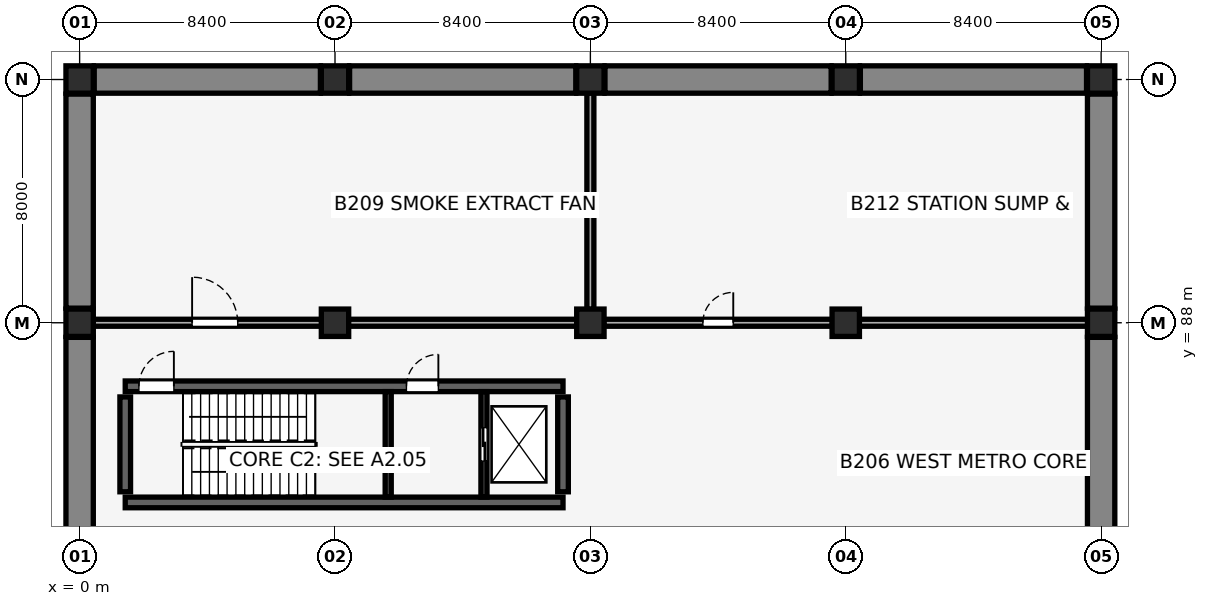
"""IFC4 building model, lengths in metres.
Left out: names, types, materials, properties, quantities, classifications, styles, units other than length and angle.
Written with IfcOpenShell. Run it as: python <this file> out.ifc"""

import sys

from ifc_helpers import new_model, si_unit, direction, frame, frame_2d, origin, origin_2d, place, context, subcontext, project, spatial, rectangle, extrude, element, fill, save


model = new_model("IFC4")
c1 = context("Model", 3, precision=1e-05, world=origin(), true_north=direction((0.0, 1.0)))
c2 = subcontext(c1, "Body", "Model", "MODEL_VIEW")
j1 = project(units=[si_unit("LENGTHUNIT", "METRE"), si_unit("PLANEANGLEUNIT", "RADIAN")], contexts=[c1])
p1 = place(None, origin())
s1 = spatial("IfcSite", under=j1, at=p1, CompositionType="ELEMENT")
p2 = place(p1, origin())
s2 = spatial("IfcBuilding", under=s1, at=p2, CompositionType="ELEMENT")
p3 = place(p2, frame((0.0, 0.0, -10.88)))
s3 = spatial("IfcBuildingStorey", under=s2, at=p3, CompositionType="ELEMENT", Elevation=-10.88)
for number, where, z_axis, x_axis in (
    (1, (0.0, 80.48, 0.0), (0.0, 0.0, 1.0), (0.0, 1.0, 0.0)),
    (2, (0.0, 88.48, 0.0), (0.0, 0.0, 1.0), (0.0, 1.0, 0.0)),
):
    element("IfcWall", number, at=place(p3, frame(where, z_axis=z_axis, x_axis=x_axis)), inside=s3, PredefinedType="SHEAR", context=c2, shape_type="SweptSolid", body=[
        extrude(rectangle(XDim=7.04, YDim=0.9, at=frame_2d((3.52, 0.0))), origin(), (0.0, 0.0, 1.0), 5.04),
    ])
p4 = place(p3, frame((0.48, 96.0, 0.0), z_axis=(0.0, 0.0, 1.0), x_axis=(1.0, 0.0, 0.0)))
e3 = element("IfcWall", 3, at=p4, inside=s3, PredefinedType="SHEAR", context=c2, shape_type="SweptSolid", body=[
    extrude(rectangle(XDim=7.44, YDim=0.9, at=frame_2d((3.72, 0.0))), origin(), (0.0, 0.0, 1.0), 5.04),
])
p5 = place(p3, frame((8.88, 96.0, 0.0), z_axis=(0.0, 0.0, 1.0), x_axis=(1.0, 0.0, 0.0)))
e4 = element("IfcWall", 4, at=p5, inside=s3, PredefinedType="SHEAR", context=c2, shape_type="SweptSolid", body=[
    extrude(rectangle(XDim=7.44, YDim=0.9, at=frame_2d((3.72, 0.0))), origin(), (0.0, 0.0, 1.0), 5.04),
])
p6 = place(p3, frame((17.28, 96.0, 0.0), z_axis=(0.0, 0.0, 1.0), x_axis=(1.0, 0.0, 0.0)))
e5 = element("IfcWall", 5, at=p6, inside=s3, PredefinedType="SHEAR", context=c2, shape_type="SweptSolid", body=[
    extrude(rectangle(XDim=7.44, YDim=0.9, at=frame_2d((3.72, 0.0))), origin(), (0.0, 0.0, 1.0), 5.04),
])
p7 = place(p3, frame((25.68, 96.0, 0.0), z_axis=(0.0, 0.0, 1.0), x_axis=(1.0, 0.0, 0.0)))
e6 = element("IfcWall", 6, at=p7, inside=s3, PredefinedType="SHEAR", context=c2, shape_type="SweptSolid", body=[
    extrude(rectangle(XDim=7.44, YDim=0.9, at=frame_2d((3.72, 0.0))), origin(), (0.0, 0.0, 1.0), 5.04),
])
for number, where, z_axis, x_axis in (
    (7, (33.6, 80.48, 0.0), (0.0, 0.0, 1.0), (0.0, 1.0, 0.0)),
    (8, (33.6, 88.48, 0.0), (0.0, 0.0, 1.0), (0.0, 1.0, 0.0)),
):
    element("IfcWall", number, at=place(p3, frame(where, z_axis=z_axis, x_axis=x_axis)), inside=s3, PredefinedType="SHEAR", context=c2, shape_type="SweptSolid", body=[
        extrude(rectangle(XDim=7.04, YDim=0.9, at=frame_2d((3.52, 0.0))), origin(), (0.0, 0.0, 1.0), 5.04),
    ])
p8 = place(p3, frame((1.5, 82.09, 0.0), z_axis=(0.0, 0.0, 1.0), x_axis=(1.0, 0.0, 0.0)))
e9 = element("IfcWall", 9, at=p8, inside=s3, PredefinedType="SHEAR", context=c2, shape_type="SweptSolid", body=[
    extrude(rectangle(XDim=14.4, YDim=0.35, at=frame_2d((7.2, 0.0))), origin(), (0.0, 0.0, 1.0), 5.04),
])
p9 = place(p3, frame((1.5, 85.91, 0.0), z_axis=(0.0, 0.0, 1.0), x_axis=(1.0, 0.0, 0.0)))
e10 = element("IfcWall", 10, at=p9, inside=s3, PredefinedType="SHEAR", context=c2, shape_type="SweptSolid", body=[
    extrude(rectangle(XDim=14.4, YDim=0.35, at=frame_2d((7.2, 0.0))), origin(), (0.0, 0.0, 1.0), 5.04),
])
p10 = place(p9, frame((0.45, 0.0, 0.0), z_axis=(0.0, 0.0, 1.0), x_axis=(1.0, 0.0, 0.0)))
e11 = element("IfcOpeningElement", 11, at=p10, cuts=e10, PredefinedType="OPENING", context=c2, shape_type="SweptSolid", body=[
    extrude(rectangle(XDim=1.15, YDim=2.15, at=frame_2d((0.575, 1.075))), frame((0.0, 0.185, 0.0), z_axis=(0.0, -1.0, 0.0), x_axis=(1.0, 0.0, 0.0)), (0.0, 0.0, 1.0), 0.37),
])
p11 = place(p9, frame((9.25, 0.0, 0.0), z_axis=(0.0, 0.0, 1.0), x_axis=(1.0, 0.0, 0.0)))
e12 = element("IfcOpeningElement", 12, at=p11, cuts=e10, PredefinedType="OPENING", context=c2, shape_type="SweptSolid", body=[
    extrude(rectangle(XDim=1.05, YDim=2.15, at=frame_2d((0.525, 1.075))), frame((0.0, 0.185, 0.0), z_axis=(0.0, -1.0, 0.0), x_axis=(1.0, 0.0, 0.0)), (0.0, 0.0, 1.0), 0.37),
])
for number, where, z_axis, x_axis in (
    (13, (1.5, 82.44, 0.0), (0.0, 0.0, 1.0), (0.0, 1.0, 0.0)),
    (14, (15.9, 82.44, 0.0), (0.0, 0.0, 1.0), (0.0, 1.0, 0.0)),
):
    element("IfcWall", number, at=place(p3, frame(where, z_axis=z_axis, x_axis=x_axis)), inside=s3, PredefinedType="SHEAR", context=c2, shape_type="SweptSolid", body=[
        extrude(rectangle(XDim=3.12, YDim=0.35, at=frame_2d((1.56, 0.0))), origin(), (0.0, 0.0, 1.0), 5.04),
    ])
for number, where, z_axis, x_axis in (
    (15, (0.0, 88.0, 0.0), (0.0, 0.0, 1.0), (1.0, 0.0, 0.0)),
    (16, (0.0, 96.0, 0.0), (0.0, 0.0, 1.0), (1.0, 0.0, 0.0)),
    (17, (8.4, 88.0, 0.0), (0.0, 0.0, 1.0), (1.0, 0.0, 0.0)),
    (18, (8.4, 96.0, 0.0), (0.0, 0.0, 1.0), (1.0, 0.0, 0.0)),
    (19, (16.8, 88.0, 0.0), (0.0, 0.0, 1.0), (1.0, 0.0, 0.0)),
    (20, (16.8, 96.0, 0.0), (0.0, 0.0, 1.0), (1.0, 0.0, 0.0)),
    (21, (25.2, 88.0, 0.0), (0.0, 0.0, 1.0), (1.0, 0.0, 0.0)),
    (22, (25.2, 96.0, 0.0), (0.0, 0.0, 1.0), (1.0, 0.0, 0.0)),
    (23, (33.6, 88.0, 0.0), (0.0, 0.0, 1.0), (1.0, 0.0, 0.0)),
    (24, (33.6, 96.0, 0.0), (0.0, 0.0, 1.0), (1.0, 0.0, 0.0)),
):
    element("IfcColumn", number, at=place(p3, frame(where, z_axis=z_axis, x_axis=x_axis)), inside=s3, PredefinedType="COLUMN", context=c2, shape_type="SweptSolid", body=[
        extrude(rectangle(XDim=0.9, YDim=0.9, at=origin_2d()), origin(), (0.0, 0.0, 1.0), 5.04),
    ])
p12 = place(p3, frame((10.15, 82.265, 0.0), z_axis=(0.0, 0.0, 1.0), x_axis=(0.0, 1.0, 0.0)))
e25 = element("IfcWall", 25, at=p12, inside=s3, PredefinedType="SHEAR", context=c2, shape_type="SweptSolid", body=[
    extrude(rectangle(XDim=3.47, YDim=0.2, at=frame_2d((1.735, 0.0))), origin(), (0.0, 0.0, 1.0), 5.04),
])
p13 = place(p3, frame((13.3, 82.265, 0.0), z_axis=(0.0, 0.0, 1.0), x_axis=(0.0, 1.0, 0.0)))
e26 = element("IfcWall", 26, at=p13, inside=s3, PredefinedType="SHEAR", context=c2, shape_type="SweptSolid", body=[
    extrude(rectangle(XDim=3.47, YDim=0.2, at=frame_2d((1.735, 0.0))), origin(), (0.0, 0.0, 1.0), 5.04),
])
p14 = place(p13, frame((1.185, 0.0, 0.0), z_axis=(0.0, 0.0, 1.0), x_axis=(1.0, 0.0, 0.0)))
e27 = element("IfcOpeningElement", 27, at=p14, cuts=e26, PredefinedType="OPENING", context=c2, shape_type="SweptSolid", body=[
    extrude(rectangle(XDim=1.1, YDim=2.15, at=frame_2d((0.55, 1.075))), frame((0.0, 0.11, 0.0), z_axis=(0.0, -1.0, 0.0), x_axis=(1.0, 0.0, 0.0)), (0.0, 0.0, 1.0), 0.22),
])
p15 = place(p3, frame((0.44, 88.0, 0.0), z_axis=(0.0, 0.0, 1.0), x_axis=(1.0, 0.0, 0.0)))
e28 = element("IfcWall", 28, at=p15, inside=s3, PredefinedType="PARTITIONING", context=c2, shape_type="SweptSolid", body=[
    extrude(rectangle(XDim=7.52, YDim=0.23, at=frame_2d((3.76, 0.0))), origin(), (0.0, 0.0, 1.0), 3.94),
])
p16 = place(p15, frame((3.26, 0.0, 0.0), z_axis=(0.0, 0.0, 1.0), x_axis=(1.0, 0.0, 0.0)))
e29 = element("IfcOpeningElement", 29, at=p16, cuts=e28, PredefinedType="OPENING", context=c2, shape_type="SweptSolid", body=[
    extrude(rectangle(XDim=1.5, YDim=2.2, at=frame_2d((0.75, 1.1))), frame((0.0, 0.125, 0.0), z_axis=(0.0, -1.0, 0.0), x_axis=(1.0, 0.0, 0.0)), (0.0, 0.0, 1.0), 0.25),
])
p17 = place(p3, frame((17.24, 88.0, 0.0), z_axis=(0.0, 0.0, 1.0), x_axis=(1.0, 0.0, 0.0)))
e30 = element("IfcWall", 30, at=p17, inside=s3, PredefinedType="PARTITIONING", context=c2, shape_type="SweptSolid", body=[
    extrude(rectangle(XDim=7.52, YDim=0.23, at=frame_2d((3.76, 0.0))), origin(), (0.0, 0.0, 1.0), 3.94),
])
p18 = place(p17, frame((3.26, 0.0, 0.0), z_axis=(0.0, 0.0, 1.0), x_axis=(1.0, 0.0, 0.0)))
e31 = element("IfcOpeningElement", 31, at=p18, cuts=e30, PredefinedType="OPENING", context=c2, shape_type="SweptSolid", body=[
    extrude(rectangle(XDim=1.0, YDim=2.15, at=frame_2d((0.5, 1.075))), frame((0.0, 0.125, 0.0), z_axis=(0.0, -1.0, 0.0), x_axis=(1.0, 0.0, 0.0)), (0.0, 0.0, 1.0), 0.25),
])
p19 = place(p3, frame((8.84, 88.0, 0.0), z_axis=(0.0, 0.0, 1.0), x_axis=(1.0, 0.0, 0.0)))
e32 = element("IfcWall", 32, at=p19, inside=s3, PredefinedType="PARTITIONING", context=c2, shape_type="SweptSolid", body=[
    extrude(rectangle(XDim=7.52, YDim=0.23, at=frame_2d((3.76, 0.0))), origin(), (0.0, 0.0, 1.0), 4.14),
])
p20 = place(p3, frame((16.8, 88.44, 0.0), z_axis=(0.0, 0.0, 1.0), x_axis=(0.0, 1.0, 0.0)))
e33 = element("IfcWall", 33, at=p20, inside=s3, PredefinedType="PARTITIONING", context=c2, shape_type="SweptSolid", body=[
    extrude(rectangle(XDim=7.12, YDim=0.23, at=frame_2d((3.56, 0.0))), origin(), (0.0, 0.0, 1.0), 4.09),
])
p21 = place(p3, frame((25.64, 88.0, 0.0), z_axis=(0.0, 0.0, 1.0), x_axis=(1.0, 0.0, 0.0)))
e34 = element("IfcWall", 34, at=p21, inside=s3, PredefinedType="PARTITIONING", context=c2, shape_type="SweptSolid", body=[
    extrude(rectangle(XDim=7.52, YDim=0.23, at=frame_2d((3.76, 0.0))), origin(), (0.0, 0.0, 1.0), 4.14),
])
p22 = place(p10, origin())
e35 = element("IfcDoor", 35, at=p22, inside=s3, OperationType="SINGLE_SWING_RIGHT", PredefinedType="DOOR", context=c2, shape_type="SweptSolid", body=[
    extrude(rectangle(XDim=1.15, YDim=2.15, at=frame_2d((0.575, 1.075))), frame((0.0, 0.025, 0.0), z_axis=(0.0, -1.0, 0.0), x_axis=(1.0, 0.0, 0.0)), (0.0, 0.0, 1.0), 0.05),
])
fill(e11, e35)
p23 = place(p11, origin())
e36 = element("IfcDoor", 36, at=p23, inside=s3, OperationType="SINGLE_SWING_RIGHT", PredefinedType="DOOR", context=c2, shape_type="SweptSolid", body=[
    extrude(rectangle(XDim=1.05, YDim=2.15, at=frame_2d((0.525, 1.075))), frame((0.0, 0.025, 0.0), z_axis=(0.0, -1.0, 0.0), x_axis=(1.0, 0.0, 0.0)), (0.0, 0.0, 1.0), 0.05),
])
fill(e12, e36)
p24 = place(p14, origin())
e37 = element("IfcDoor", 37, at=p24, inside=s3, OperationType="DOUBLE_DOOR_SLIDING", PredefinedType="DOOR", context=c2, shape_type="SweptSolid", body=[
    extrude(rectangle(XDim=1.1, YDim=2.15, at=frame_2d((0.55, 1.075))), frame((0.0, 0.025, 0.0), z_axis=(0.0, -1.0, 0.0), x_axis=(1.0, 0.0, 0.0)), (0.0, 0.0, 1.0), 0.05),
])
fill(e27, e37)
p25 = place(p16, origin())
e38 = element("IfcDoor", 38, at=p25, inside=s3, OperationType="SINGLE_SWING_LEFT", PredefinedType="DOOR", context=c2, shape_type="SweptSolid", body=[
    extrude(rectangle(XDim=1.5, YDim=2.2, at=frame_2d((0.75, 1.1))), frame((0.0, 0.025, 0.0), z_axis=(0.0, -1.0, 0.0), x_axis=(1.0, 0.0, 0.0)), (0.0, 0.0, 1.0), 0.05),
])
fill(e29, e38)
p26 = place(p18, origin())
e39 = element("IfcDoor", 39, at=p26, inside=s3, OperationType="SINGLE_SWING_RIGHT", PredefinedType="DOOR", context=c2, shape_type="SweptSolid", body=[
    extrude(rectangle(XDim=1.0, YDim=2.15, at=frame_2d((0.5, 1.075))), frame((0.0, 0.025, 0.0), z_axis=(0.0, -1.0, 0.0), x_axis=(1.0, 0.0, 0.0)), (0.0, 0.0, 1.0), 0.05),
])
fill(e31, e39)
save(model, sys.argv[1])
